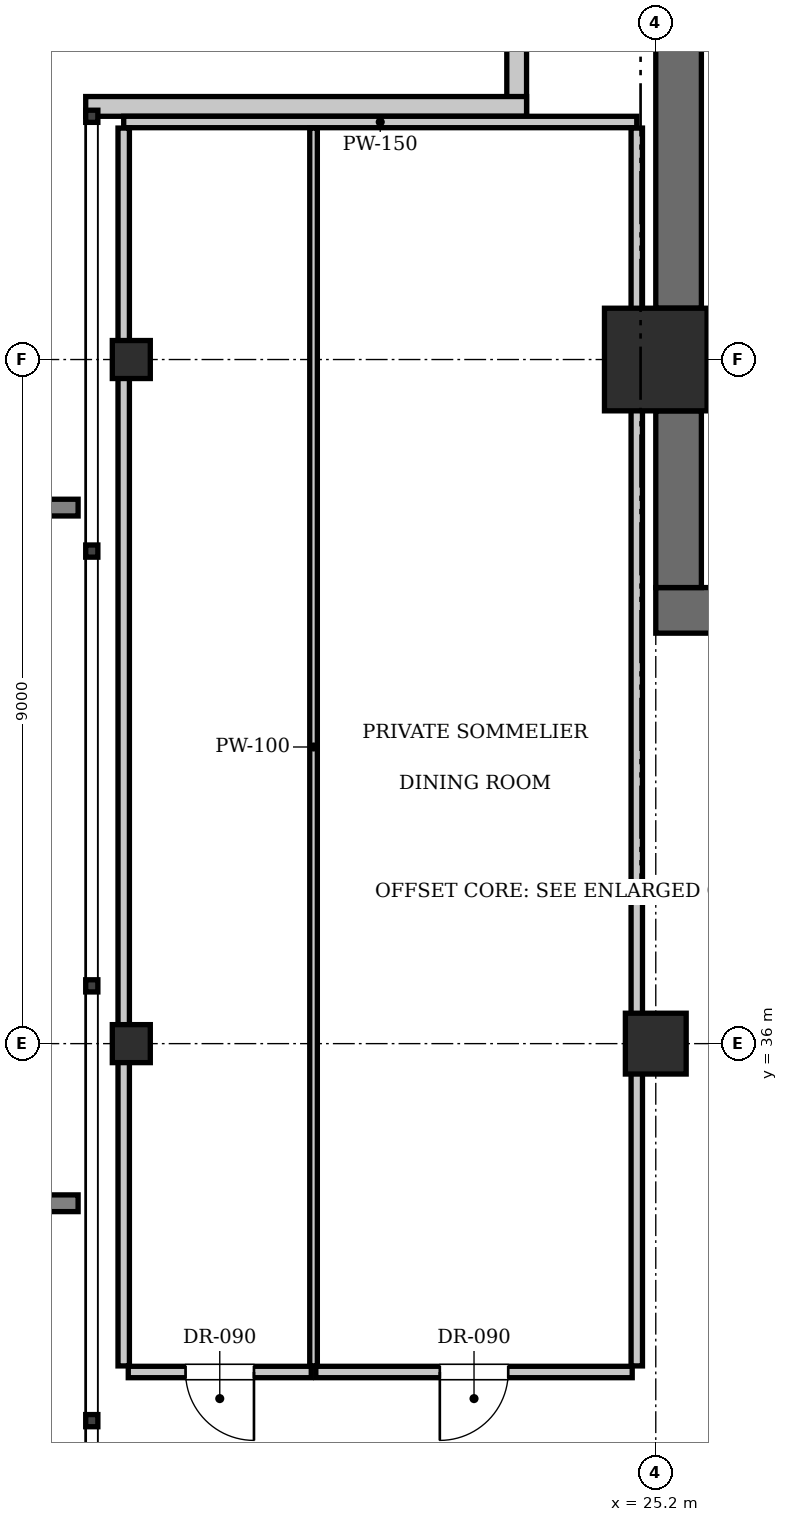
"""IFC4 building model, lengths in metres.
Left out: names, types, materials, properties, quantities, classifications, styles, units other than length and angle.
Written with IfcOpenShell. Run it as: python <this file> out.ifc"""

import sys

from ifc_helpers import new_model, si_unit, direction, frame, frame_2d, origin, origin_2d, place, context, subcontext, project, spatial, rectangle, i_section, extrude, element, fill, save


model = new_model("IFC4")
c1 = context("Model", 3, precision=1e-05, world=origin(), true_north=direction((0.0, 1.0)))
c2 = subcontext(c1, "Body", "Model", "MODEL_VIEW")
j1 = project(units=[si_unit("LENGTHUNIT", "METRE"), si_unit("PLANEANGLEUNIT", "RADIAN")], contexts=[c1])
p1 = place(None, origin())
s1 = spatial("IfcSite", under=j1, at=p1, CompositionType="ELEMENT")
p2 = place(p1, origin())
s2 = spatial("IfcBuilding", under=s1, at=p2, CompositionType="ELEMENT")
p3 = place(p2, frame((0.0, 0.0, 337.4)))
s3 = spatial("IfcBuildingStorey", under=s2, at=p3, CompositionType="ELEMENT", Elevation=337.4)
p4 = place(p3, frame((25.2, 45.0, 0.0), z_axis=(0.0, 0.0, 1.0), x_axis=(1.0, 0.0, 0.0)))
e1 = element("IfcColumn", 1, at=p4, inside=s3, PredefinedType="COLUMN", context=c2, shape_type="SweptSolid", body=[
    extrude(rectangle(XDim=1.35, YDim=1.35, at=origin_2d()), origin(), (0.0, 0.0, 1.0), 3.85),
])
p5 = place(p3, frame((25.2, 41.7, 0.0), z_axis=(0.0, 0.0, 1.0), x_axis=(1.0, 0.0, 0.0)))
e2 = element("IfcWall", 2, at=p5, inside=s3, PredefinedType="SHEAR", context=c2, shape_type="SweptSolid", body=[
    extrude(rectangle(XDim=6.8, YDim=0.6, at=frame_2d((3.4, 0.0))), origin(), (0.0, 0.0, 1.0), 3.85),
])
p6 = place(p5, frame((1.65, 0.0, 0.0)))
e3 = element("IfcOpeningElement", 3, at=p6, cuts=e2, PredefinedType="OPENING", context=c2, shape_type="SweptSolid", body=[
    extrude(rectangle(XDim=1.15, YDim=2.15, at=frame_2d((0.575, 1.075))), frame((0.0, 0.31, 0.0), z_axis=(0.0, -1.0, 0.0), x_axis=(1.0, 0.0, 0.0)), (0.0, 0.0, 1.0), 0.62),
])
p7 = place(p5, frame((5.15, 0.0, 0.0)))
e4 = element("IfcOpeningElement", 4, at=p7, cuts=e2, PredefinedType="OPENING", context=c2, shape_type="SweptSolid", body=[
    extrude(rectangle(XDim=1.1, YDim=2.2, at=frame_2d((0.55, 1.1))), frame((0.0, 0.31, 0.0), z_axis=(0.0, -1.0, 0.0), x_axis=(1.0, 0.0, 0.0)), (0.0, 0.0, 1.0), 0.62),
])
p8 = place(p3, frame((25.5, 42.0, 0.0), z_axis=(0.0, 0.0, 1.0), x_axis=(0.0, 1.0, 0.0)))
e5 = element("IfcWall", 5, at=p8, inside=s3, PredefinedType="SHEAR", context=c2, shape_type="SweptSolid", body=[
    extrude(rectangle(XDim=2.325, YDim=0.6, at=frame_2d((1.163, 0.0))), origin(), (0.0, 0.0, 1.0), 3.85),
])
p9 = place(p3, frame((25.5, 45.675, 0.0), z_axis=(0.0, 0.0, 1.0), x_axis=(0.0, 1.0, 0.0)))
e6 = element("IfcWall", 6, at=p9, inside=s3, PredefinedType="SHEAR", context=c2, shape_type="SweptSolid", body=[
    extrude(rectangle(XDim=7.725, YDim=0.6, at=frame_2d((3.862, 0.0))), origin(), (0.0, 0.0, 1.0), 3.85),
])
p10 = place(p3, frame((25.2, 36.0, 0.0), z_axis=(0.0, 0.0, 1.0), x_axis=(1.0, 0.0, 0.0)))
e7 = element("IfcColumn", 7, at=p10, inside=s3, PredefinedType="COLUMN", context=c2, shape_type="SweptSolid", body=[
    extrude(rectangle(XDim=0.8, YDim=0.8, at=origin_2d()), origin(), (0.0, 0.0, 1.0), 3.85),
])
for number, where, z_axis, x_axis in (
    (8, (18.3, 36.0, 0.0), (0.0, 0.0, 1.0), (1.0, 0.0, 0.0)),
    (9, (18.3, 45.0, 0.0), (0.0, 0.0, 1.0), (1.0, 0.0, 0.0)),
):
    element("IfcColumn", number, at=place(p3, frame(where, z_axis=z_axis, x_axis=x_axis)), inside=s3, PredefinedType="COLUMN", context=c2, shape_type="SweptSolid", body=[
        extrude(i_section(OverallWidth=0.5, OverallDepth=0.5, WebThickness=0.022, FlangeThickness=0.032, at=origin_2d()), origin(), (0.0, 0.0, 1.0), 3.85),
    ])
for number, where, z_axis, x_axis in (
    (10, (23.37, 48.2, 0.0), (0.0, 0.0, 1.0), (0.0, 1.0, 0.0)),
    (11, (17.7, 48.33, 0.0), (0.0, 0.0, 1.0), (1.0, 0.0, 0.0)),
):
    element("IfcWall", number, at=place(p3, frame(where, z_axis=z_axis, x_axis=x_axis)), inside=s3, PredefinedType="SOLIDWALL", context=c2, shape_type="SweptSolid", body=[
        extrude(rectangle(XDim=5.8, YDim=0.26, at=frame_2d((2.9, 0.0))), origin(), (0.0, 0.0, 1.0), 3.61),
    ])
p11 = place(p3, frame((18.2, 48.125, 0.0), z_axis=(0.0, 0.0, 1.0), x_axis=(1.0, 0.0, 0.0)))
e12 = element("IfcWall", 12, at=p11, inside=s3, PredefinedType="PARTITIONING", context=c2, shape_type="SweptSolid", body=[
    extrude(rectangle(XDim=6.75, YDim=0.15, at=frame_2d((3.375, 0.0))), origin(), (0.0, 0.0, 1.0), 3.61),
])
p12 = place(p3, frame((18.2, 31.76, 0.0), z_axis=(0.0, 0.0, 1.0), x_axis=(0.0, 1.0, 0.0)))
e13 = element("IfcWall", 13, at=p12, inside=s3, PredefinedType="PARTITIONING", context=c2, shape_type="SweptSolid", body=[
    extrude(rectangle(XDim=16.285, YDim=0.15, at=frame_2d((8.143, 0.0))), origin(), (0.0, 0.0, 1.0), 3.141),
])
p13 = place(p3, frame((24.95, 31.76, 0.0), z_axis=(0.0, 0.0, 1.0), x_axis=(0.0, 1.0, 0.0)))
e14 = element("IfcWall", 14, at=p13, inside=s3, PredefinedType="PARTITIONING", context=c2, shape_type="SweptSolid", body=[
    extrude(rectangle(XDim=16.285, YDim=0.15, at=frame_2d((8.143, 0.0))), origin(), (0.0, 0.0, 1.0), 3.61),
])
p14 = place(p3, frame((18.26, 31.68, 0.0), z_axis=(0.0, 0.0, 1.0), x_axis=(1.0, 0.0, 0.0)))
e15 = element("IfcWall", 15, at=p14, inside=s3, PredefinedType="PARTITIONING", context=c2, shape_type="SweptSolid", body=[
    extrude(rectangle(XDim=2.407, YDim=0.15, at=frame_2d((1.204, 0.0))), origin(), (0.0, 0.0, 1.0), 3.61),
])
p15 = place(p14, frame((0.754, 0.0, 0.0)))
e16 = element("IfcOpeningElement", 16, at=p15, cuts=e15, PredefinedType="OPENING", context=c2, shape_type="SweptSolid", body=[
    extrude(rectangle(XDim=0.9, YDim=2.1, at=frame_2d((0.45, 1.05))), frame((0.0, 0.085, 0.0), z_axis=(0.0, -1.0, 0.0), x_axis=(1.0, 0.0, 0.0)), (0.0, 0.0, 1.0), 0.17),
])
p16 = place(p3, frame((20.698, 31.76, 0.0), z_axis=(0.0, 0.0, 1.0), x_axis=(0.0, 1.0, 0.0)))
e17 = element("IfcWall", 17, at=p16, inside=s3, PredefinedType="PARTITIONING", context=c2, shape_type="SweptSolid", body=[
    extrude(rectangle(XDim=16.285, YDim=0.1, at=frame_2d((8.143, 0.0))), origin(), (0.0, 0.0, 1.0), 3.61),
])
p17 = place(p3, frame((20.728, 31.68, 0.0), z_axis=(0.0, 0.0, 1.0), x_axis=(1.0, 0.0, 0.0)))
e18 = element("IfcWall", 18, at=p17, inside=s3, PredefinedType="PARTITIONING", context=c2, shape_type="SweptSolid", body=[
    extrude(rectangle(XDim=4.162, YDim=0.15, at=frame_2d((2.081, 0.0))), origin(), (0.0, 0.0, 1.0), 3.61),
])
p18 = place(p17, frame((1.631, 0.0, 0.0)))
e19 = element("IfcOpeningElement", 19, at=p18, cuts=e18, PredefinedType="OPENING", context=c2, shape_type="SweptSolid", body=[
    extrude(rectangle(XDim=0.9, YDim=2.1, at=frame_2d((0.45, 1.05))), frame((0.0, 0.085, 0.0), z_axis=(0.0, -1.0, 0.0), x_axis=(1.0, 0.0, 0.0)), (0.0, 0.0, 1.0), 0.17),
])
p19 = place(p15, frame((0.9, 0.0, 0.0), z_axis=(0.0, 0.0, 1.0), x_axis=(-1.0, 0.0, 0.0)))
e20 = element("IfcDoor", 20, at=p19, inside=s3, OperationType="SINGLE_SWING_LEFT", PredefinedType="DOOR", context=c2, shape_type="SweptSolid", body=[
    extrude(rectangle(XDim=0.9, YDim=2.1, at=frame_2d((0.45, 1.05))), frame((0.0, 0.025, 0.0), z_axis=(0.0, -1.0, 0.0), x_axis=(1.0, 0.0, 0.0)), (0.0, 0.0, 1.0), 0.05),
])
fill(e16, e20)
p20 = place(p18, frame((0.9, 0.0, 0.0), z_axis=(0.0, 0.0, 1.0), x_axis=(-1.0, 0.0, 0.0)))
e21 = element("IfcDoor", 21, at=p20, inside=s3, OperationType="SINGLE_SWING_RIGHT", PredefinedType="DOOR", context=c2, shape_type="SweptSolid", body=[
    extrude(rectangle(XDim=0.9, YDim=2.1, at=frame_2d((0.45, 1.05))), frame((0.0, 0.025, 0.0), z_axis=(0.0, -1.0, 0.0), x_axis=(1.0, 0.0, 0.0)), (0.0, 0.0, 1.0), 0.05),
])
fill(e19, e21)
save(model, sys.argv[1])
